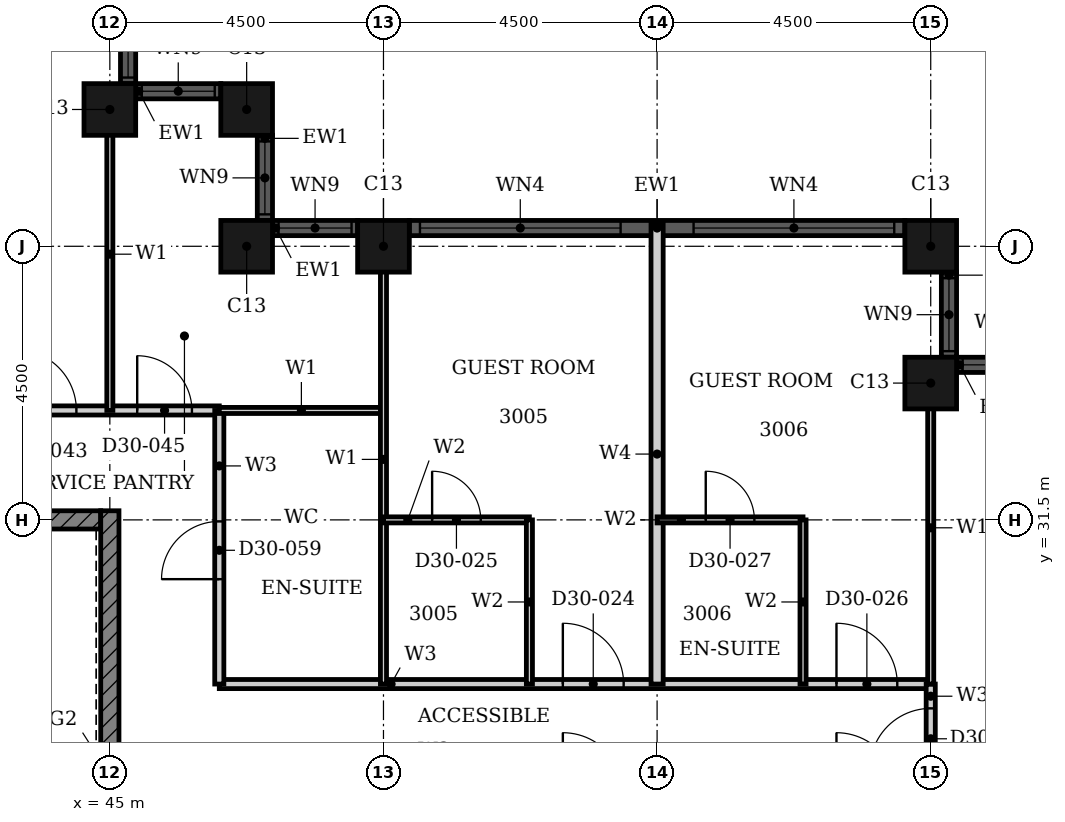
"""IFC4 building model, lengths in metres.
Left out: names, types, materials, properties, quantities, classifications, styles, units other than length and angle.
Written with IfcOpenShell. Run it as: python <this file> out.ifc"""

import sys

from ifc_helpers import new_model, si_unit, direction, frame, frame_2d, origin, origin_2d, place, context, subcontext, project, spatial, rectangle, hollow_rectangle, extrude, element, fill, save


model = new_model("IFC4")
c1 = context("Model", 3, precision=1e-05, world=origin(), true_north=direction((0.0, 1.0)))
c2 = subcontext(c1, "Body", "Model", "MODEL_VIEW")
j1 = project(units=[si_unit("LENGTHUNIT", "METRE"), si_unit("PLANEANGLEUNIT", "RADIAN")], contexts=[c1])
p1 = place(None, origin())
s1 = spatial("IfcSite", under=j1, at=p1, CompositionType="ELEMENT")
p2 = place(p1, origin())
s2 = spatial("IfcBuilding", under=s1, at=p2, CompositionType="ELEMENT")
p3 = place(p2, frame((0.0, 0.0, 122.4)))
s3 = spatial("IfcBuildingStorey", under=s2, at=p3, CompositionType="ELEMENT", Elevation=122.4)
for number, where, z_axis, x_axis in (
    (1, (58.5, 33.75, 0.0), (0.0, 0.0, 1.0), (1.0, 0.0, 0.0)),
    (2, (58.5, 36.0, 0.0), (0.0, 0.0, 1.0), (1.0, 0.0, 0.0)),
    (3, (49.5, 36.0, 0.0), (0.0, 0.0, 1.0), (1.0, 0.0, 0.0)),
    (4, (47.25, 36.0, 0.0), (0.0, 0.0, 1.0), (1.0, 0.0, 0.0)),
    (5, (47.25, 38.25, 0.0), (0.0, 0.0, 1.0), (1.0, 0.0, 0.0)),
    (6, (45.0, 38.25, 0.0), (0.0, 0.0, 1.0), (1.0, 0.0, 0.0)),
):
    element("IfcColumn", number, at=place(p3, frame(where, z_axis=z_axis, x_axis=x_axis)), inside=s3, PredefinedType="COLUMN", context=c2, shape_type="SweptSolid", body=[
        extrude(hollow_rectangle(XDim=0.85, YDim=0.85, WallThickness=0.026, at=origin_2d()), origin(), (0.0, 0.0, 1.0), 3.6),
    ])
p4 = place(p3, frame((60.325, 34.05, 0.0), z_axis=(0.0, 0.0, 1.0), x_axis=(-1.0, 0.0, 0.0)))
e7 = element("IfcWall", 7, at=p4, inside=s3, PredefinedType="SOLIDWALL", context=c2, shape_type="SweptSolid", body=[
    extrude(rectangle(XDim=1.4, YDim=0.25, at=frame_2d((0.7, 0.0))), origin(), (0.0, 0.0, 1.0), 3.6),
])
p5 = place(p4, frame((0.1, 0.0, 0.9)))
e8 = element("IfcOpeningElement", 8, at=p5, cuts=e7, PredefinedType="OPENING", context=c2, shape_type="SweptSolid", body=[
    extrude(rectangle(XDim=1.2, YDim=2.08, at=frame_2d((0.6, 1.04))), frame((0.0, 0.135, 0.0), z_axis=(0.0, -1.0, 0.0), x_axis=(1.0, 0.0, 0.0)), (0.0, 0.0, 1.0), 0.27),
])
p6 = place(p3, frame((58.8, 34.175, 0.0), z_axis=(0.0, 0.0, 1.0), x_axis=(0.0, 1.0, 0.0)))
e9 = element("IfcWall", 9, at=p6, inside=s3, PredefinedType="SOLIDWALL", context=c2, shape_type="SweptSolid", body=[
    extrude(rectangle(XDim=1.4, YDim=0.25, at=frame_2d((0.7, 0.0))), origin(), (0.0, 0.0, 1.0), 3.6),
])
p7 = place(p6, frame((0.1, 0.0, 0.9)))
e10 = element("IfcOpeningElement", 10, at=p7, cuts=e9, PredefinedType="OPENING", context=c2, shape_type="SweptSolid", body=[
    extrude(rectangle(XDim=1.2, YDim=2.08, at=frame_2d((0.6, 1.04))), frame((0.0, 0.135, 0.0), z_axis=(0.0, -1.0, 0.0), x_axis=(1.0, 0.0, 0.0)), (0.0, 0.0, 1.0), 0.27),
])
p8 = place(p3, frame((58.075, 36.3, 0.0), z_axis=(0.0, 0.0, 1.0), x_axis=(-1.0, 0.0, 0.0)))
e11 = element("IfcWall", 11, at=p8, inside=s3, PredefinedType="SOLIDWALL", context=c2, shape_type="SweptSolid", body=[
    extrude(rectangle(XDim=8.15, YDim=0.25, at=frame_2d((4.075, 0.0))), origin(), (0.0, 0.0, 1.0), 3.6),
])
p9 = place(p8, frame((0.175, 0.0, 0.9)))
e12 = element("IfcOpeningElement", 12, at=p9, cuts=e11, PredefinedType="OPENING", context=c2, shape_type="SweptSolid", body=[
    extrude(rectangle(XDim=3.3, YDim=2.08, at=frame_2d((1.65, 1.04))), frame((0.0, 0.135, 0.0), z_axis=(0.0, -1.0, 0.0), x_axis=(1.0, 0.0, 0.0)), (0.0, 0.0, 1.0), 0.27),
])
p10 = place(p8, frame((4.675, 0.0, 0.9)))
e13 = element("IfcOpeningElement", 13, at=p10, cuts=e11, PredefinedType="OPENING", context=c2, shape_type="SweptSolid", body=[
    extrude(rectangle(XDim=3.3, YDim=2.08, at=frame_2d((1.65, 1.04))), frame((0.0, 0.135, 0.0), z_axis=(0.0, -1.0, 0.0), x_axis=(1.0, 0.0, 0.0)), (0.0, 0.0, 1.0), 0.27),
])
p11 = place(p3, frame((49.075, 36.3, 0.0), z_axis=(0.0, 0.0, 1.0), x_axis=(-1.0, 0.0, 0.0)))
e14 = element("IfcWall", 14, at=p11, inside=s3, PredefinedType="SOLIDWALL", context=c2, shape_type="SweptSolid", body=[
    extrude(rectangle(XDim=1.4, YDim=0.25, at=frame_2d((0.7, 0.0))), origin(), (0.0, 0.0, 1.0), 3.6),
])
p12 = place(p11, frame((0.1, 0.0, 0.9)))
e15 = element("IfcOpeningElement", 15, at=p12, cuts=e14, PredefinedType="OPENING", context=c2, shape_type="SweptSolid", body=[
    extrude(rectangle(XDim=1.2, YDim=2.08, at=frame_2d((0.6, 1.04))), frame((0.0, 0.135, 0.0), z_axis=(0.0, -1.0, 0.0), x_axis=(1.0, 0.0, 0.0)), (0.0, 0.0, 1.0), 0.27),
])
p13 = place(p3, frame((47.55, 36.425, 0.0), z_axis=(0.0, 0.0, 1.0), x_axis=(0.0, 1.0, 0.0)))
e16 = element("IfcWall", 16, at=p13, inside=s3, PredefinedType="SOLIDWALL", context=c2, shape_type="SweptSolid", body=[
    extrude(rectangle(XDim=1.4, YDim=0.25, at=frame_2d((0.7, 0.0))), origin(), (0.0, 0.0, 1.0), 3.6),
])
p14 = place(p13, frame((0.1, 0.0, 0.9)))
e17 = element("IfcOpeningElement", 17, at=p14, cuts=e16, PredefinedType="OPENING", context=c2, shape_type="SweptSolid", body=[
    extrude(rectangle(XDim=1.2, YDim=2.08, at=frame_2d((0.6, 1.04))), frame((0.0, 0.135, 0.0), z_axis=(0.0, -1.0, 0.0), x_axis=(1.0, 0.0, 0.0)), (0.0, 0.0, 1.0), 0.27),
])
p15 = place(p3, frame((46.825, 38.55, 0.0), z_axis=(0.0, 0.0, 1.0), x_axis=(-1.0, 0.0, 0.0)))
e18 = element("IfcWall", 18, at=p15, inside=s3, PredefinedType="SOLIDWALL", context=c2, shape_type="SweptSolid", body=[
    extrude(rectangle(XDim=1.4, YDim=0.25, at=frame_2d((0.7, 0.0))), origin(), (0.0, 0.0, 1.0), 3.6),
])
p16 = place(p15, frame((0.1, 0.0, 0.9)))
e19 = element("IfcOpeningElement", 19, at=p16, cuts=e18, PredefinedType="OPENING", context=c2, shape_type="SweptSolid", body=[
    extrude(rectangle(XDim=1.2, YDim=2.08, at=frame_2d((0.6, 1.04))), frame((0.0, 0.135, 0.0), z_axis=(0.0, -1.0, 0.0), x_axis=(1.0, 0.0, 0.0)), (0.0, 0.0, 1.0), 0.27),
])
p17 = place(p3, frame((45.3, 38.675, 0.0), z_axis=(0.0, 0.0, 1.0), x_axis=(0.0, 1.0, 0.0)))
e20 = element("IfcWall", 20, at=p17, inside=s3, PredefinedType="SOLIDWALL", context=c2, shape_type="SweptSolid", body=[
    extrude(rectangle(XDim=1.4, YDim=0.25, at=frame_2d((0.7, 0.0))), origin(), (0.0, 0.0, 1.0), 3.6),
])
p18 = place(p17, frame((0.1, 0.0, 0.9)))
e21 = element("IfcOpeningElement", 21, at=p18, cuts=e20, PredefinedType="OPENING", context=c2, shape_type="SweptSolid", body=[
    extrude(rectangle(XDim=1.2, YDim=2.08, at=frame_2d((0.6, 1.04))), frame((0.0, 0.135, 0.0), z_axis=(0.0, -1.0, 0.0), x_axis=(1.0, 0.0, 0.0)), (0.0, 0.0, 1.0), 0.27),
])
p19 = place(p3, frame((40.625, 31.5, 0.0), z_axis=(0.0, 0.0, 1.0), x_axis=(1.0, 0.0, 0.0)))
e22 = element("IfcWall", 22, at=p19, inside=s3, PredefinedType="SHEAR", context=c2, shape_type="SweptSolid", body=[
    extrude(rectangle(XDim=4.225, YDim=0.3, at=frame_2d((2.113, 0.0))), origin(), (0.0, 0.0, 1.0), 3.3),
])
p20 = place(p3, frame((45.0, 22.35, 0.0), z_axis=(0.0, 0.0, 1.0), x_axis=(0.0, 1.0, 0.0)))
e23 = element("IfcWall", 23, at=p20, inside=s3, PredefinedType="SHEAR", context=c2, shape_type="SweptSolid", body=[
    extrude(rectangle(XDim=9.3, YDim=0.3, at=frame_2d((4.65, 0.0))), origin(), (0.0, 0.0, 1.0), 3.3),
])
p21 = place(p3, frame((46.8, 28.8, 0.0), z_axis=(0.0, 0.0, 1.0), x_axis=(1.0, 0.0, 0.0)))
e24 = element("IfcWall", 24, at=p21, inside=s3, PredefinedType="PARTITIONING", context=c2, shape_type="SweptSolid", body=[
    extrude(rectangle(XDim=11.7, YDim=0.15, at=frame_2d((5.85, 0.0))), origin(), (0.0, 0.0, 1.0), 3.3),
])
p22 = place(p21, frame((5.65, 0.0, 0.0)))
e25 = element("IfcOpeningElement", 25, at=p22, cuts=e24, PredefinedType="OPENING", context=c2, shape_type="SweptSolid", body=[
    extrude(rectangle(XDim=1.0, YDim=2.1, at=frame_2d((0.5, 1.05))), frame((0.0, 0.085, 0.0), z_axis=(0.0, -1.0, 0.0), x_axis=(1.0, 0.0, 0.0)), (0.0, 0.0, 1.0), 0.17),
])
p23 = place(p21, frame((10.15, 0.0, 0.0)))
e26 = element("IfcOpeningElement", 26, at=p23, cuts=e24, PredefinedType="OPENING", context=c2, shape_type="SweptSolid", body=[
    extrude(rectangle(XDim=1.0, YDim=2.1, at=frame_2d((0.5, 1.05))), frame((0.0, 0.085, 0.0), z_axis=(0.0, -1.0, 0.0), x_axis=(1.0, 0.0, 0.0)), (0.0, 0.0, 1.0), 0.17),
])
p24 = place(p3, frame((40.5, 33.3, 0.0), z_axis=(0.0, 0.0, 1.0), x_axis=(1.0, 0.0, 0.0)))
e27 = element("IfcWall", 27, at=p24, inside=s3, PredefinedType="PARTITIONING", context=c2, shape_type="SweptSolid", body=[
    extrude(rectangle(XDim=6.3, YDim=0.15, at=frame_2d((3.15, 0.0))), origin(), (0.0, 0.0, 1.0), 3.3),
])
p25 = place(p24, frame((2.95, 0.0, 0.0)))
e28 = element("IfcOpeningElement", 28, at=p25, cuts=e27, PredefinedType="OPENING", context=c2, shape_type="SweptSolid", body=[
    extrude(rectangle(XDim=1.0, YDim=2.1, at=frame_2d((0.5, 1.05))), frame((0.0, 0.085, 0.0), z_axis=(0.0, -1.0, 0.0), x_axis=(1.0, 0.0, 0.0)), (0.0, 0.0, 1.0), 0.17),
])
p26 = place(p24, frame((4.95, 0.0, 0.0)))
e29 = element("IfcOpeningElement", 29, at=p26, cuts=e27, PredefinedType="OPENING", context=c2, shape_type="SweptSolid", body=[
    extrude(rectangle(XDim=0.9, YDim=2.1, at=frame_2d((0.45, 1.05))), frame((0.0, 0.085, 0.0), z_axis=(0.0, -1.0, 0.0), x_axis=(1.0, 0.0, 0.0)), (0.0, 0.0, 1.0), 0.17),
])
p27 = place(p3, frame((46.8, 28.8, 0.0), z_axis=(0.0, 0.0, 1.0), x_axis=(0.0, 1.0, 0.0)))
e30 = element("IfcWall", 30, at=p27, inside=s3, PredefinedType="PARTITIONING", context=c2, shape_type="SweptSolid", body=[
    extrude(rectangle(XDim=4.5, YDim=0.15, at=frame_2d((2.25, 0.0))), origin(), (0.0, 0.0, 1.0), 3.3),
])
p28 = place(p27, frame((1.725, 0.0, 0.0)))
e31 = element("IfcOpeningElement", 31, at=p28, cuts=e30, PredefinedType="OPENING", context=c2, shape_type="SweptSolid", body=[
    extrude(rectangle(XDim=0.95, YDim=2.1, at=frame_2d((0.475, 1.05))), frame((0.0, 0.085, 0.0), z_axis=(0.0, -1.0, 0.0), x_axis=(1.0, 0.0, 0.0)), (0.0, 0.0, 1.0), 0.17),
])
p29 = place(p3, frame((58.5, 27.0, 0.0), z_axis=(0.0, 0.0, 1.0), x_axis=(0.0, 1.0, 0.0)))
e32 = element("IfcWall", 32, at=p29, inside=s3, PredefinedType="PARTITIONING", context=c2, shape_type="SweptSolid", body=[
    extrude(rectangle(XDim=1.8, YDim=0.15, at=frame_2d((0.9, 0.0))), origin(), (0.0, 0.0, 1.0), 3.3),
])
p30 = place(p29, frame((0.4, 0.0, 0.0)))
e33 = element("IfcOpeningElement", 33, at=p30, cuts=e32, PredefinedType="OPENING", context=c2, shape_type="SweptSolid", body=[
    extrude(rectangle(XDim=1.0, YDim=2.1, at=frame_2d((0.5, 1.05))), frame((0.0, 0.085, 0.0), z_axis=(0.0, -1.0, 0.0), x_axis=(1.0, 0.0, 0.0)), (0.0, 0.0, 1.0), 0.17),
])
p31 = place(p3, frame((46.8, 33.3, 0.0), z_axis=(0.0, 0.0, 1.0), x_axis=(1.0, 0.0, 0.0)))
e34 = element("IfcWall", 34, at=p31, inside=s3, PredefinedType="PARTITIONING", context=c2, shape_type="SweptSolid", body=[
    extrude(rectangle(XDim=2.7, YDim=0.1, at=frame_2d((1.35, 0.0))), origin(), (0.0, 0.0, 1.0), 3.3),
])
p32 = place(p3, frame((45.0, 33.3, 0.0), z_axis=(0.0, 0.0, 1.0), x_axis=(0.0, 1.0, 0.0)))
e35 = element("IfcWall", 35, at=p32, inside=s3, PredefinedType="PARTITIONING", context=c2, shape_type="SweptSolid", body=[
    extrude(rectangle(XDim=5.14, YDim=0.1, at=frame_2d((2.57, 0.0))), origin(), (0.0, 0.0, 1.0), 3.3),
])
p33 = place(p3, frame((49.5, 28.8, 0.0), z_axis=(0.0, 0.0, 1.0), x_axis=(0.0, 1.0, 0.0)))
e36 = element("IfcWall", 36, at=p33, inside=s3, PredefinedType="PARTITIONING", context=c2, shape_type="SweptSolid", body=[
    extrude(rectangle(XDim=7.39, YDim=0.1, at=frame_2d((3.695, 0.0))), origin(), (0.0, 0.0, 1.0), 2.38),
])
p34 = place(p3, frame((58.5, 28.8, 0.0), z_axis=(0.0, 0.0, 1.0), x_axis=(0.0, 1.0, 0.0)))
e37 = element("IfcWall", 37, at=p34, inside=s3, PredefinedType="PARTITIONING", context=c2, shape_type="SweptSolid", body=[
    extrude(rectangle(XDim=5.14, YDim=0.1, at=frame_2d((2.57, 0.0))), origin(), (0.0, 0.0, 1.0), 3.3),
])
p35 = place(p3, frame((54.0, 28.8, 0.0), z_axis=(0.0, 0.0, 1.0), x_axis=(0.0, 1.0, 0.0)))
e38 = element("IfcWall", 38, at=p35, inside=s3, PredefinedType="PARTITIONING", context=c2, shape_type="SweptSolid", body=[
    extrude(rectangle(XDim=7.565, YDim=0.2, at=frame_2d((3.782, 0.0))), origin(), (0.0, 0.0, 1.0), 3.3),
])
p36 = place(p3, frame((49.5, 31.5, 0.0), z_axis=(0.0, 0.0, 1.0), x_axis=(1.0, 0.0, 0.0)))
e39 = element("IfcWall", 39, at=p36, inside=s3, PredefinedType="PARTITIONING", context=c2, shape_type="SweptSolid", body=[
    extrude(rectangle(XDim=2.4, YDim=0.1, at=frame_2d((1.2, 0.0))), origin(), (0.0, 0.0, 1.0), 2.58),
])
p37 = place(p36, frame((0.8, 0.0, 0.0)))
e40 = element("IfcOpeningElement", 40, at=p37, cuts=e39, PredefinedType="OPENING", context=c2, shape_type="SweptSolid", body=[
    extrude(rectangle(XDim=0.8, YDim=2.1, at=frame_2d((0.4, 1.05))), frame((0.0, 0.06, 0.0), z_axis=(0.0, -1.0, 0.0), x_axis=(1.0, 0.0, 0.0)), (0.0, 0.0, 1.0), 0.12),
])
p38 = place(p3, frame((54.0, 31.5, 0.0), z_axis=(0.0, 0.0, 1.0), x_axis=(1.0, 0.0, 0.0)))
e41 = element("IfcWall", 41, at=p38, inside=s3, PredefinedType="PARTITIONING", context=c2, shape_type="SweptSolid", body=[
    extrude(rectangle(XDim=2.4, YDim=0.1, at=frame_2d((1.2, 0.0))), origin(), (0.0, 0.0, 1.0), 2.58),
])
p39 = place(p38, frame((0.8, 0.0, 0.0)))
e42 = element("IfcOpeningElement", 42, at=p39, cuts=e41, PredefinedType="OPENING", context=c2, shape_type="SweptSolid", body=[
    extrude(rectangle(XDim=0.8, YDim=2.1, at=frame_2d((0.4, 1.05))), frame((0.0, 0.06, 0.0), z_axis=(0.0, -1.0, 0.0), x_axis=(1.0, 0.0, 0.0)), (0.0, 0.0, 1.0), 0.12),
])
for number, where, z_axis, x_axis in (
    (43, (51.9, 28.8, 0.0), (0.0, 0.0, 1.0), (0.0, 1.0, 0.0)),
    (44, (56.4, 28.8, 0.0), (0.0, 0.0, 1.0), (0.0, 1.0, 0.0)),
):
    element("IfcWall", number, at=place(p3, frame(where, z_axis=z_axis, x_axis=x_axis)), inside=s3, PredefinedType="PARTITIONING", context=c2, shape_type="SweptSolid", body=[
        extrude(rectangle(XDim=2.7, YDim=0.1, at=frame_2d((1.35, 0.0))), origin(), (0.0, 0.0, 1.0), 3.3),
    ])
p40 = place(p5, origin())
e45 = element("IfcWindow", 45, at=p40, inside=s3, PartitioningType="SINGLE_PANEL", PredefinedType="WINDOW", context=c2, shape_type="SweptSolid", body=[
    extrude(rectangle(XDim=1.2, YDim=2.08, at=frame_2d((0.6, 1.04))), frame((0.0, 0.03, 0.0), z_axis=(0.0, -1.0, 0.0), x_axis=(1.0, 0.0, 0.0)), (0.0, 0.0, 1.0), 0.06),
])
fill(e8, e45)
p41 = place(p7, origin())
e46 = element("IfcWindow", 46, at=p41, inside=s3, PartitioningType="SINGLE_PANEL", PredefinedType="WINDOW", context=c2, shape_type="SweptSolid", body=[
    extrude(rectangle(XDim=1.2, YDim=2.08, at=frame_2d((0.6, 1.04))), frame((0.0, 0.03, 0.0), z_axis=(0.0, -1.0, 0.0), x_axis=(1.0, 0.0, 0.0)), (0.0, 0.0, 1.0), 0.06),
])
fill(e10, e46)
p42 = place(p9, origin())
e47 = element("IfcWindow", 47, at=p42, inside=s3, PartitioningType="SINGLE_PANEL", PredefinedType="WINDOW", context=c2, shape_type="SweptSolid", body=[
    extrude(rectangle(XDim=3.3, YDim=2.08, at=frame_2d((1.65, 1.04))), frame((0.0, 0.03, 0.0), z_axis=(0.0, -1.0, 0.0), x_axis=(1.0, 0.0, 0.0)), (0.0, 0.0, 1.0), 0.06),
])
fill(e12, e47)
p43 = place(p10, origin())
e48 = element("IfcWindow", 48, at=p43, inside=s3, PartitioningType="SINGLE_PANEL", PredefinedType="WINDOW", context=c2, shape_type="SweptSolid", body=[
    extrude(rectangle(XDim=3.3, YDim=2.08, at=frame_2d((1.65, 1.04))), frame((0.0, 0.03, 0.0), z_axis=(0.0, -1.0, 0.0), x_axis=(1.0, 0.0, 0.0)), (0.0, 0.0, 1.0), 0.06),
])
fill(e13, e48)
p44 = place(p12, origin())
e49 = element("IfcWindow", 49, at=p44, inside=s3, PartitioningType="SINGLE_PANEL", PredefinedType="WINDOW", context=c2, shape_type="SweptSolid", body=[
    extrude(rectangle(XDim=1.2, YDim=2.08, at=frame_2d((0.6, 1.04))), frame((0.0, 0.03, 0.0), z_axis=(0.0, -1.0, 0.0), x_axis=(1.0, 0.0, 0.0)), (0.0, 0.0, 1.0), 0.06),
])
fill(e15, e49)
p45 = place(p14, origin())
e50 = element("IfcWindow", 50, at=p45, inside=s3, PartitioningType="SINGLE_PANEL", PredefinedType="WINDOW", context=c2, shape_type="SweptSolid", body=[
    extrude(rectangle(XDim=1.2, YDim=2.08, at=frame_2d((0.6, 1.04))), frame((0.0, 0.03, 0.0), z_axis=(0.0, -1.0, 0.0), x_axis=(1.0, 0.0, 0.0)), (0.0, 0.0, 1.0), 0.06),
])
fill(e17, e50)
p46 = place(p16, origin())
e51 = element("IfcWindow", 51, at=p46, inside=s3, PartitioningType="SINGLE_PANEL", PredefinedType="WINDOW", context=c2, shape_type="SweptSolid", body=[
    extrude(rectangle(XDim=1.2, YDim=2.08, at=frame_2d((0.6, 1.04))), frame((0.0, 0.03, 0.0), z_axis=(0.0, -1.0, 0.0), x_axis=(1.0, 0.0, 0.0)), (0.0, 0.0, 1.0), 0.06),
])
fill(e19, e51)
p47 = place(p18, origin())
e52 = element("IfcWindow", 52, at=p47, inside=s3, PartitioningType="SINGLE_PANEL", PredefinedType="WINDOW", context=c2, shape_type="SweptSolid", body=[
    extrude(rectangle(XDim=1.2, YDim=2.08, at=frame_2d((0.6, 1.04))), frame((0.0, 0.03, 0.0), z_axis=(0.0, -1.0, 0.0), x_axis=(1.0, 0.0, 0.0)), (0.0, 0.0, 1.0), 0.06),
])
fill(e21, e52)
p48 = place(p22, origin())
e53 = element("IfcDoor", 53, at=p48, inside=s3, OperationType="SINGLE_SWING_RIGHT", PredefinedType="DOOR", context=c2, shape_type="SweptSolid", body=[
    extrude(rectangle(XDim=1.0, YDim=2.1, at=frame_2d((0.5, 1.05))), frame((0.0, 0.025, 0.0), z_axis=(0.0, -1.0, 0.0), x_axis=(1.0, 0.0, 0.0)), (0.0, 0.0, 1.0), 0.05),
])
fill(e25, e53)
p49 = place(p37, origin())
e54 = element("IfcDoor", 54, at=p49, inside=s3, OperationType="SINGLE_SWING_RIGHT", PredefinedType="DOOR", context=c2, shape_type="SweptSolid", body=[
    extrude(rectangle(XDim=0.8, YDim=2.1, at=frame_2d((0.4, 1.05))), frame((0.0, 0.025, 0.0), z_axis=(0.0, -1.0, 0.0), x_axis=(1.0, 0.0, 0.0)), (0.0, 0.0, 1.0), 0.05),
])
fill(e40, e54)
p50 = place(p23, origin())
e55 = element("IfcDoor", 55, at=p50, inside=s3, OperationType="SINGLE_SWING_RIGHT", PredefinedType="DOOR", context=c2, shape_type="SweptSolid", body=[
    extrude(rectangle(XDim=1.0, YDim=2.1, at=frame_2d((0.5, 1.05))), frame((0.0, 0.025, 0.0), z_axis=(0.0, -1.0, 0.0), x_axis=(1.0, 0.0, 0.0)), (0.0, 0.0, 1.0), 0.05),
])
fill(e26, e55)
p51 = place(p39, origin())
e56 = element("IfcDoor", 56, at=p51, inside=s3, OperationType="SINGLE_SWING_RIGHT", PredefinedType="DOOR", context=c2, shape_type="SweptSolid", body=[
    extrude(rectangle(XDim=0.8, YDim=2.1, at=frame_2d((0.4, 1.05))), frame((0.0, 0.025, 0.0), z_axis=(0.0, -1.0, 0.0), x_axis=(1.0, 0.0, 0.0)), (0.0, 0.0, 1.0), 0.05),
])
fill(e42, e56)
p52 = place(p30, origin())
e57 = element("IfcDoor", 57, at=p52, inside=s3, OperationType="SINGLE_SWING_LEFT", PredefinedType="DOOR", context=c2, shape_type="SweptSolid", body=[
    extrude(rectangle(XDim=1.0, YDim=2.1, at=frame_2d((0.5, 1.05))), frame((0.0, 0.025, 0.0), z_axis=(0.0, -1.0, 0.0), x_axis=(1.0, 0.0, 0.0)), (0.0, 0.0, 1.0), 0.05),
])
fill(e33, e57)
p53 = place(p25, origin())
e58 = element("IfcDoor", 58, at=p53, inside=s3, OperationType="SINGLE_SWING_RIGHT", PredefinedType="DOOR", context=c2, shape_type="SweptSolid", body=[
    extrude(rectangle(XDim=1.0, YDim=2.1, at=frame_2d((0.5, 1.05))), frame((0.0, 0.025, 0.0), z_axis=(0.0, -1.0, 0.0), x_axis=(1.0, 0.0, 0.0)), (0.0, 0.0, 1.0), 0.05),
])
fill(e28, e58)
p54 = place(p26, origin())
e59 = element("IfcDoor", 59, at=p54, inside=s3, OperationType="SINGLE_SWING_RIGHT", PredefinedType="DOOR", context=c2, shape_type="SweptSolid", body=[
    extrude(rectangle(XDim=0.9, YDim=2.1, at=frame_2d((0.45, 1.05))), frame((0.0, 0.025, 0.0), z_axis=(0.0, -1.0, 0.0), x_axis=(1.0, 0.0, 0.0)), (0.0, 0.0, 1.0), 0.05),
])
fill(e29, e59)
p55 = place(p28, origin())
e60 = element("IfcDoor", 60, at=p55, inside=s3, OperationType="SINGLE_SWING_LEFT", PredefinedType="DOOR", context=c2, shape_type="SweptSolid", body=[
    extrude(rectangle(XDim=0.95, YDim=2.1, at=frame_2d((0.475, 1.05))), frame((0.0, 0.025, 0.0), z_axis=(0.0, -1.0, 0.0), x_axis=(1.0, 0.0, 0.0)), (0.0, 0.0, 1.0), 0.05),
])
fill(e31, e60)
save(model, sys.argv[1])
